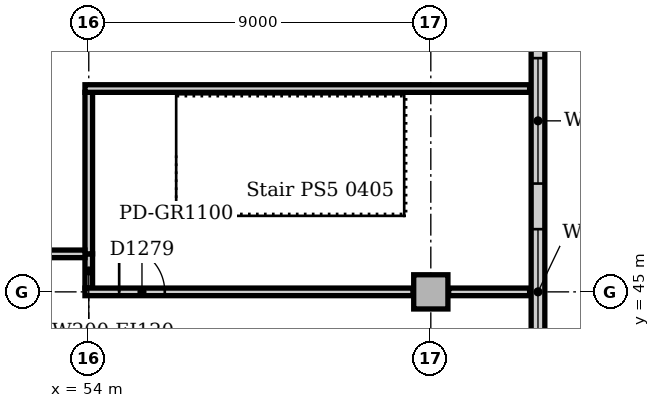
"""IFC4 building model, lengths in metres.
Left out: names, types, materials, properties, quantities, classifications, styles, units other than length and angle.
Written with IfcOpenShell. Run it as: python <this file> out.ifc"""

import sys

from ifc_helpers import new_model, si_unit, direction, frame, frame_2d, origin, origin_2d, place, context, subcontext, project, spatial, rectangle, extrude, element, fill, save


model = new_model("IFC4")
c1 = context("Model", 3, precision=1e-05, world=origin(), true_north=direction((0.0, 1.0)))
c2 = subcontext(c1, "Body", "Model", "MODEL_VIEW")
j1 = project(units=[si_unit("LENGTHUNIT", "METRE"), si_unit("PLANEANGLEUNIT", "RADIAN")], contexts=[c1])
p1 = place(None, origin())
s1 = spatial("IfcSite", under=j1, at=p1, CompositionType="ELEMENT")
p2 = place(p1, origin())
s2 = spatial("IfcBuilding", under=s1, at=p2, CompositionType="ELEMENT")
p3 = place(p2, frame((0.0, 0.0, 21.0)))
s3 = spatial("IfcBuildingStorey", under=s2, at=p3, CompositionType="ELEMENT", Elevation=21.0)
p4 = place(p3, frame((63.0, 45.0, 0.0), z_axis=(0.0, 0.0, 1.0), x_axis=(1.0, 0.0, 0.0)))
e1 = element("IfcColumn", 1, at=p4, inside=s3, PredefinedType="COLUMN", context=c2, shape_type="SweptSolid", body=[
    extrude(rectangle(XDim=0.9, YDim=0.9, at=origin_2d()), origin(), (0.0, 0.0, 1.0), 4.7),
])
p5 = place(p3, frame((65.82, -9.0, 0.0), z_axis=(0.0, 0.0, 1.0), x_axis=(0.0, 1.0, 0.0)))
e2 = element("IfcWall", 2, at=p5, inside=s3, PredefinedType="STANDARD", context=c2, shape_type="SweptSolid", body=[
    extrude(rectangle(XDim=63.0, YDim=0.36, at=frame_2d((31.5, 0.0))), origin(), (0.0, 0.0, 1.0), 4.85),
])
p6 = place(p5, frame((2.85, 0.0, 0.9)))
e3 = element("IfcOpeningElement", 3, at=p6, cuts=e2, PredefinedType="OPENING", context=c2, shape_type="SweptSolid", body=[
    extrude(rectangle(XDim=3.3, YDim=2.4, at=frame_2d((1.65, 1.2))), frame((0.0, 0.19, 0.0), z_axis=(0.0, -1.0, 0.0), x_axis=(1.0, 0.0, 0.0)), (0.0, 0.0, 1.0), 0.38),
])
p7 = place(p5, frame((7.35, 0.0, 0.9)))
e4 = element("IfcOpeningElement", 4, at=p7, cuts=e2, PredefinedType="OPENING", context=c2, shape_type="SweptSolid", body=[
    extrude(rectangle(XDim=3.3, YDim=2.4, at=frame_2d((1.65, 1.2))), frame((0.0, 0.19, 0.0), z_axis=(0.0, -1.0, 0.0), x_axis=(1.0, 0.0, 0.0)), (0.0, 0.0, 1.0), 0.38),
])
p8 = place(p5, frame((11.85, 0.0, 0.9)))
e5 = element("IfcOpeningElement", 5, at=p8, cuts=e2, PredefinedType="OPENING", context=c2, shape_type="SweptSolid", body=[
    extrude(rectangle(XDim=3.3, YDim=2.4, at=frame_2d((1.65, 1.2))), frame((0.0, 0.19, 0.0), z_axis=(0.0, -1.0, 0.0), x_axis=(1.0, 0.0, 0.0)), (0.0, 0.0, 1.0), 0.38),
])
p9 = place(p5, frame((16.35, 0.0, 0.9)))
e6 = element("IfcOpeningElement", 6, at=p9, cuts=e2, PredefinedType="OPENING", context=c2, shape_type="SweptSolid", body=[
    extrude(rectangle(XDim=3.3, YDim=2.4, at=frame_2d((1.65, 1.2))), frame((0.0, 0.19, 0.0), z_axis=(0.0, -1.0, 0.0), x_axis=(1.0, 0.0, 0.0)), (0.0, 0.0, 1.0), 0.38),
])
p10 = place(p5, frame((20.85, 0.0, 0.9)))
e7 = element("IfcOpeningElement", 7, at=p10, cuts=e2, PredefinedType="OPENING", context=c2, shape_type="SweptSolid", body=[
    extrude(rectangle(XDim=3.3, YDim=2.4, at=frame_2d((1.65, 1.2))), frame((0.0, 0.19, 0.0), z_axis=(0.0, -1.0, 0.0), x_axis=(1.0, 0.0, 0.0)), (0.0, 0.0, 1.0), 0.38),
])
p11 = place(p5, frame((25.35, 0.0, 0.9)))
e8 = element("IfcOpeningElement", 8, at=p11, cuts=e2, PredefinedType="OPENING", context=c2, shape_type="SweptSolid", body=[
    extrude(rectangle(XDim=3.3, YDim=2.4, at=frame_2d((1.65, 1.2))), frame((0.0, 0.19, 0.0), z_axis=(0.0, -1.0, 0.0), x_axis=(1.0, 0.0, 0.0)), (0.0, 0.0, 1.0), 0.38),
])
p12 = place(p5, frame((29.85, 0.0, 0.9)))
e9 = element("IfcOpeningElement", 9, at=p12, cuts=e2, PredefinedType="OPENING", context=c2, shape_type="SweptSolid", body=[
    extrude(rectangle(XDim=3.3, YDim=2.4, at=frame_2d((1.65, 1.2))), frame((0.0, 0.19, 0.0), z_axis=(0.0, -1.0, 0.0), x_axis=(1.0, 0.0, 0.0)), (0.0, 0.0, 1.0), 0.38),
])
p13 = place(p5, frame((34.35, 0.0, 0.9)))
e10 = element("IfcOpeningElement", 10, at=p13, cuts=e2, PredefinedType="OPENING", context=c2, shape_type="SweptSolid", body=[
    extrude(rectangle(XDim=3.3, YDim=2.4, at=frame_2d((1.65, 1.2))), frame((0.0, 0.19, 0.0), z_axis=(0.0, -1.0, 0.0), x_axis=(1.0, 0.0, 0.0)), (0.0, 0.0, 1.0), 0.38),
])
p14 = place(p5, frame((38.85, 0.0, 0.9)))
e11 = element("IfcOpeningElement", 11, at=p14, cuts=e2, PredefinedType="OPENING", context=c2, shape_type="SweptSolid", body=[
    extrude(rectangle(XDim=3.3, YDim=2.4, at=frame_2d((1.65, 1.2))), frame((0.0, 0.19, 0.0), z_axis=(0.0, -1.0, 0.0), x_axis=(1.0, 0.0, 0.0)), (0.0, 0.0, 1.0), 0.38),
])
p15 = place(p5, frame((43.35, 0.0, 0.9)))
e12 = element("IfcOpeningElement", 12, at=p15, cuts=e2, PredefinedType="OPENING", context=c2, shape_type="SweptSolid", body=[
    extrude(rectangle(XDim=3.3, YDim=2.4, at=frame_2d((1.65, 1.2))), frame((0.0, 0.19, 0.0), z_axis=(0.0, -1.0, 0.0), x_axis=(1.0, 0.0, 0.0)), (0.0, 0.0, 1.0), 0.38),
])
p16 = place(p5, frame((47.85, 0.0, 0.9)))
e13 = element("IfcOpeningElement", 13, at=p16, cuts=e2, PredefinedType="OPENING", context=c2, shape_type="SweptSolid", body=[
    extrude(rectangle(XDim=3.3, YDim=2.4, at=frame_2d((1.65, 1.2))), frame((0.0, 0.19, 0.0), z_axis=(0.0, -1.0, 0.0), x_axis=(1.0, 0.0, 0.0)), (0.0, 0.0, 1.0), 0.38),
])
p17 = place(p5, frame((52.35, 0.0, 0.9)))
e14 = element("IfcOpeningElement", 14, at=p17, cuts=e2, PredefinedType="OPENING", context=c2, shape_type="SweptSolid", body=[
    extrude(rectangle(XDim=3.3, YDim=2.4, at=frame_2d((1.65, 1.2))), frame((0.0, 0.19, 0.0), z_axis=(0.0, -1.0, 0.0), x_axis=(1.0, 0.0, 0.0)), (0.0, 0.0, 1.0), 0.38),
])
p18 = place(p5, frame((56.85, 0.0, 0.9)))
e15 = element("IfcOpeningElement", 15, at=p18, cuts=e2, PredefinedType="OPENING", context=c2, shape_type="SweptSolid", body=[
    extrude(rectangle(XDim=3.3, YDim=2.4, at=frame_2d((1.65, 1.2))), frame((0.0, 0.19, 0.0), z_axis=(0.0, -1.0, 0.0), x_axis=(1.0, 0.0, 0.0)), (0.0, 0.0, 1.0), 0.38),
])
p19 = place(p3, frame((54.0, 45.1, 0.0), z_axis=(0.0, 0.0, 1.0), x_axis=(0.0, 1.0, 0.0)))
e16 = element("IfcWall", 16, at=p19, inside=s3, PredefinedType="SOLIDWALL", context=c2, shape_type="SweptSolid", body=[
    extrude(rectangle(XDim=0.9, YDim=0.2, at=frame_2d((0.45, 0.0))), origin(), (0.0, 0.0, 1.0), 4.7),
])
p20 = place(p3, frame((53.9, 45.0, 0.0), z_axis=(0.0, 0.0, 1.0), x_axis=(1.0, 0.0, 0.0)))
e17 = element("IfcWall", 17, at=p20, inside=s3, PredefinedType="SOLIDWALL", context=c2, shape_type="SweptSolid", body=[
    extrude(rectangle(XDim=8.63, YDim=0.2, at=frame_2d((4.315, 0.0))), origin(), (0.0, 0.0, 1.0), 4.7),
])
p21 = place(p20, frame((0.9, 0.0, 0.0)))
e18 = element("IfcOpeningElement", 18, at=p21, cuts=e17, PredefinedType="OPENING", context=c2, shape_type="SweptSolid", body=[
    extrude(rectangle(XDim=1.2, YDim=2.1, at=frame_2d((0.6, 1.05))), frame((0.0, 0.11, 0.0), z_axis=(0.0, -1.0, 0.0), x_axis=(1.0, 0.0, 0.0)), (0.0, 0.0, 1.0), 0.22),
])
p22 = place(p3, frame((63.47, 45.0, 0.0), z_axis=(0.0, 0.0, 1.0), x_axis=(1.0, 0.0, 0.0)))
e19 = element("IfcWall", 19, at=p22, inside=s3, PredefinedType="SOLIDWALL", context=c2, shape_type="SweptSolid", body=[
    extrude(rectangle(XDim=2.13, YDim=0.2, at=frame_2d((1.065, 0.0))), origin(), (0.0, 0.0, 1.0), 4.7),
])
p23 = place(p3, frame((54.0, 46.0, 0.0), z_axis=(0.0, 0.0, 1.0), x_axis=(0.0, 1.0, 0.0)))
e20 = element("IfcWall", 20, at=p23, inside=s3, PredefinedType="SOLIDWALL", context=c2, shape_type="SweptSolid", body=[
    extrude(rectangle(XDim=4.25, YDim=0.2, at=frame_2d((2.125, 0.0))), origin(), (0.0, 0.0, 1.0), 4.7),
])
p24 = place(p3, frame((53.9, 50.35, 0.0), z_axis=(0.0, 0.0, 1.0), x_axis=(1.0, 0.0, 0.0)))
e21 = element("IfcWall", 21, at=p24, inside=s3, PredefinedType="SOLIDWALL", context=c2, shape_type="SweptSolid", body=[
    extrude(rectangle(XDim=11.7, YDim=0.2, at=frame_2d((5.85, 0.0))), origin(), (0.0, 0.0, 1.0), 4.7),
])
p25 = place(p3, frame((45.1, 46.0, 0.0), z_axis=(0.0, 0.0, 1.0), x_axis=(1.0, 0.0, 0.0)))
e22 = element("IfcWall", 22, at=p25, inside=s3, PredefinedType="PARTITIONING", context=c2, shape_type="SweptSolid", body=[
    extrude(rectangle(XDim=8.8, YDim=0.2, at=frame_2d((4.4, 0.0))), origin(), (0.0, 0.0, 1.0), 4.7),
])
p26 = place(p25, frame((3.5, 0.0, 0.0)))
e23 = element("IfcOpeningElement", 23, at=p26, cuts=e22, PredefinedType="OPENING", context=c2, shape_type="SweptSolid", body=[
    extrude(rectangle(XDim=1.8, YDim=2.1, at=frame_2d((0.9, 1.05))), frame((0.0, 0.11, 0.0), z_axis=(0.0, -1.0, 0.0), x_axis=(1.0, 0.0, 0.0)), (0.0, 0.0, 1.0), 0.22),
])
p27 = place(p17, origin())
e24 = element("IfcWindow", 24, at=p27, inside=s3, PartitioningType="SINGLE_PANEL", PredefinedType="WINDOW", context=c2, shape_type="SweptSolid", body=[
    extrude(rectangle(XDim=3.3, YDim=2.4, at=frame_2d((1.65, 1.2))), frame((0.0, 0.13, 0.0), z_axis=(0.0, -1.0, 0.0), x_axis=(1.0, 0.0, 0.0)), (0.0, 0.0, 1.0), 0.06),
])
fill(e14, e24)
p28 = place(p18, origin())
e25 = element("IfcWindow", 25, at=p28, inside=s3, PartitioningType="SINGLE_PANEL", PredefinedType="WINDOW", context=c2, shape_type="SweptSolid", body=[
    extrude(rectangle(XDim=3.3, YDim=2.4, at=frame_2d((1.65, 1.2))), frame((0.0, 0.13, 0.0), z_axis=(0.0, -1.0, 0.0), x_axis=(1.0, 0.0, 0.0)), (0.0, 0.0, 1.0), 0.06),
])
fill(e15, e25)
p29 = place(p21, origin())
e26 = element("IfcDoor", 26, at=p29, inside=s3, OperationType="SINGLE_SWING_LEFT", PredefinedType="DOOR", context=c2, shape_type="SweptSolid", body=[
    extrude(rectangle(XDim=1.2, YDim=2.1, at=frame_2d((0.6, 1.05))), frame((0.0, 0.025, 0.0), z_axis=(0.0, -1.0, 0.0), x_axis=(1.0, 0.0, 0.0)), (0.0, 0.0, 1.0), 0.05),
])
fill(e18, e26)
save(model, sys.argv[1])
